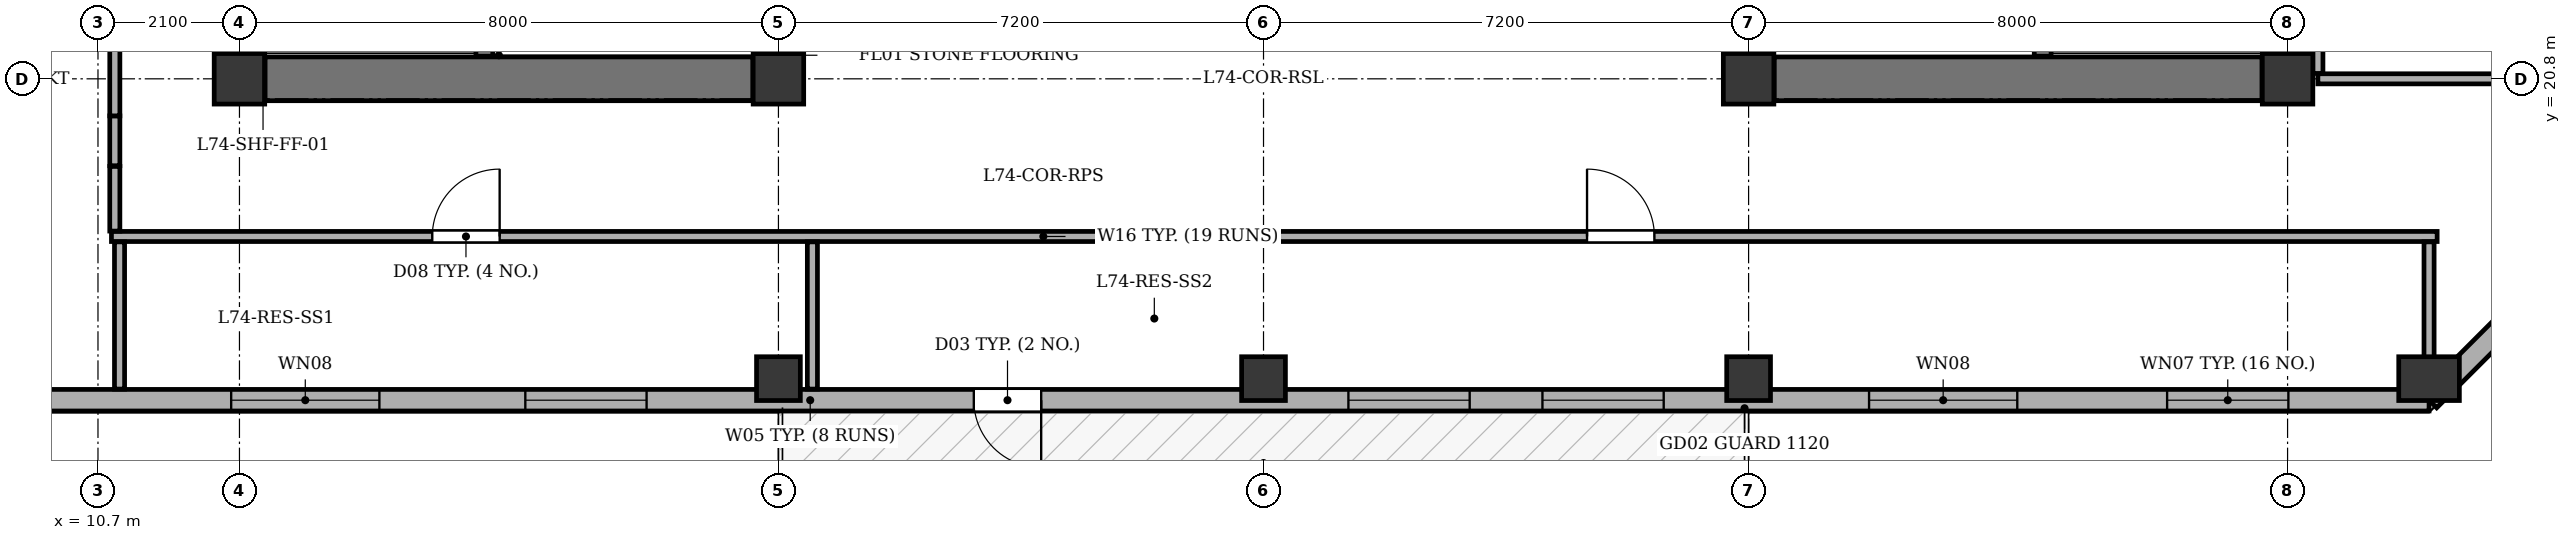
"""IFC4 building model, lengths in metres.
Left out: names, types, materials, properties, quantities, classifications, styles, units other than length and angle.
Written with IfcOpenShell. Run it as: python <this file> out.ifc"""

import sys

from ifc_helpers import new_model, si_unit, direction, frame, frame_2d, origin, origin_2d, place, context, subcontext, project, spatial, rectangle, extrude, element, fill, save


model = new_model("IFC4")
c1 = context("Model", 3, precision=1e-05, world=origin(), true_north=direction((0.0, 1.0)))
c2 = subcontext(c1, "Body", "Model", "MODEL_VIEW")
j1 = project(units=[si_unit("LENGTHUNIT", "METRE"), si_unit("PLANEANGLEUNIT", "RADIAN")], contexts=[c1])
p1 = place(None, origin())
s1 = spatial("IfcSite", under=j1, at=p1, CompositionType="ELEMENT")
p2 = place(p1, origin())
s2 = spatial("IfcBuilding", under=s1, at=p2, CompositionType="ELEMENT")
p3 = place(p2, frame((0.0, 0.0, 278.9)))
s3 = spatial("IfcBuildingStorey", under=s2, at=p3, CompositionType="ELEMENT", Elevation=278.9)
for number, where, z_axis, x_axis in (
    (1, (12.8, 20.8, 0.0), (0.0, 0.0, 1.0), (1.0, 0.0, 0.0)),
    (2, (20.8, 20.8, 0.0), (0.0, 0.0, 1.0), (1.0, 0.0, 0.0)),
    (3, (35.2, 20.8, 0.0), (0.0, 0.0, 1.0), (1.0, 0.0, 0.0)),
    (4, (43.2, 20.8, 0.0), (0.0, 0.0, 1.0), (1.0, 0.0, 0.0)),
):
    element("IfcColumn", number, at=place(p3, frame(where, z_axis=z_axis, x_axis=x_axis)), inside=s3, PredefinedType="COLUMN", context=c2, shape_type="SweptSolid", body=[
        extrude(rectangle(XDim=0.75, YDim=0.75, at=origin_2d()), origin(), (0.0, 0.0, 1.0), 3.4),
    ])
for number, where, z_axis, x_axis in (
    (5, (20.8, 16.35, 0.0), (0.0, 0.0, 1.0), (1.0, 0.0, 0.0)),
    (6, (28.0, 16.35, 0.0), (0.0, 0.0, 1.0), (1.0, 0.0, 0.0)),
    (7, (35.2, 16.35, 0.0), (0.0, 0.0, 1.0), (1.0, 0.0, 0.0)),
):
    element("IfcColumn", number, at=place(p3, frame(where, z_axis=z_axis, x_axis=x_axis)), inside=s3, PredefinedType="COLUMN", context=c2, shape_type="SweptSolid", body=[
        extrude(rectangle(XDim=0.65, YDim=0.65, at=origin_2d()), origin(), (0.0, 0.0, 1.0), 3.4),
    ])
p4 = place(p3, frame((45.3, 16.35, 0.0), z_axis=(0.0, 0.0, 1.0), x_axis=(1.0, 0.0, 0.0)))
e8 = element("IfcColumn", 8, at=p4, inside=s3, PredefinedType="COLUMN", context=c2, shape_type="SweptSolid", body=[
    extrude(rectangle(XDim=0.65, YDim=0.9, at=origin_2d()), origin(), (0.0, 0.0, 1.0), 3.4),
])
p5 = place(p3, frame((45.3, 16.03, 0.0), z_axis=(0.0, 0.0, 1.0), x_axis=(-1.0, 0.0, 0.0)))
e9 = element("IfcWall", 9, at=p5, inside=s3, PredefinedType="STANDARD", context=c2, shape_type="SweptSolid", body=[
    extrude(rectangle(XDim=37.0, YDim=0.32, at=frame_2d((18.5, 0.0))), origin(), (0.0, 0.0, 1.0), 2.575),
])
p6 = place(p5, frame((20.6, 0.0, 0.0)))
e10 = element("IfcOpeningElement", 10, at=p6, cuts=e9, PredefinedType="OPENING", context=c2, shape_type="SweptSolid", body=[
    extrude(rectangle(XDim=1.0, YDim=2.02, at=frame_2d((0.5, 1.01))), frame((0.0, 0.17, 0.0), z_axis=(0.0, -1.0, 0.0), x_axis=(1.0, 0.0, 0.0)), (0.0, 0.0, 1.0), 0.34),
])
p7 = place(p5, frame((2.088, 0.0, 0.75)))
e11 = element("IfcOpeningElement", 11, at=p7, cuts=e9, PredefinedType="OPENING", context=c2, shape_type="SweptSolid", body=[
    extrude(rectangle(XDim=1.8, YDim=1.7, at=frame_2d((0.9, 0.85))), frame((0.0, 0.17, 0.0), z_axis=(0.0, -1.0, 0.0), x_axis=(1.0, 0.0, 0.0)), (0.0, 0.0, 1.0), 0.34),
])
p8 = place(p5, frame((6.112, 0.0, 0.75)))
e12 = element("IfcOpeningElement", 12, at=p8, cuts=e9, PredefinedType="OPENING", context=c2, shape_type="SweptSolid", body=[
    extrude(rectangle(XDim=2.2, YDim=1.7, at=frame_2d((1.1, 0.85))), frame((0.0, 0.17, 0.0), z_axis=(0.0, -1.0, 0.0), x_axis=(1.0, 0.0, 0.0)), (0.0, 0.0, 1.0), 0.34),
])
p9 = place(p5, frame((11.36, 0.0, 0.75)))
e13 = element("IfcOpeningElement", 13, at=p9, cuts=e9, PredefinedType="OPENING", context=c2, shape_type="SweptSolid", body=[
    extrude(rectangle(XDim=1.8, YDim=1.7, at=frame_2d((0.9, 0.85))), frame((0.0, 0.17, 0.0), z_axis=(0.0, -1.0, 0.0), x_axis=(1.0, 0.0, 0.0)), (0.0, 0.0, 1.0), 0.34),
])
p10 = place(p5, frame((14.24, 0.0, 0.75)))
e14 = element("IfcOpeningElement", 14, at=p10, cuts=e9, PredefinedType="OPENING", context=c2, shape_type="SweptSolid", body=[
    extrude(rectangle(XDim=1.8, YDim=1.7, at=frame_2d((0.9, 0.85))), frame((0.0, 0.17, 0.0), z_axis=(0.0, -1.0, 0.0), x_axis=(1.0, 0.0, 0.0)), (0.0, 0.0, 1.0), 0.34),
])
p11 = place(p5, frame((26.457, 0.0, 0.75)))
e15 = element("IfcOpeningElement", 15, at=p11, cuts=e9, PredefinedType="OPENING", context=c2, shape_type="SweptSolid", body=[
    extrude(rectangle(XDim=1.8, YDim=1.7, at=frame_2d((0.9, 0.85))), frame((0.0, 0.17, 0.0), z_axis=(0.0, -1.0, 0.0), x_axis=(1.0, 0.0, 0.0)), (0.0, 0.0, 1.0), 0.34),
])
p12 = place(p5, frame((30.423, 0.0, 0.75)))
e16 = element("IfcOpeningElement", 16, at=p12, cuts=e9, PredefinedType="OPENING", context=c2, shape_type="SweptSolid", body=[
    extrude(rectangle(XDim=2.2, YDim=1.7, at=frame_2d((1.1, 0.85))), frame((0.0, 0.17, 0.0), z_axis=(0.0, -1.0, 0.0), x_axis=(1.0, 0.0, 0.0)), (0.0, 0.0, 1.0), 0.34),
])
p13 = place(p3, frame((49.12, 19.85, 0.0), z_axis=(0.0, 0.0, 1.0), x_axis=(-0.707106781187, -0.707106781187, 0.0)))
e17 = element("IfcWall", 17, at=p13, inside=s3, PredefinedType="STANDARD", context=c2, shape_type="SweptSolid", body=[
    extrude(rectangle(XDim=5.402, YDim=0.32, at=frame_2d((2.701, 0.0))), origin(), (0.0, 0.0, 1.0), 2.575),
])
p14 = place(p13, frame((2.001, 0.0, 0.75)))
e18 = element("IfcOpeningElement", 18, at=p14, cuts=e17, PredefinedType="OPENING", context=c2, shape_type="SweptSolid", body=[
    extrude(rectangle(XDim=1.4, YDim=1.65, at=frame_2d((0.7, 0.825))), frame((0.0, 0.17, 0.0), z_axis=(0.0, -1.0, 0.0), x_axis=(1.0, 0.0, 0.0)), (0.0, 0.0, 1.0), 0.34),
])
p15 = place(p3, frame((12.8, 21.18, 0.0), z_axis=(0.0, 0.0, 1.0), x_axis=(0.0, 1.0, 0.0)))
e19 = element("IfcWall", 19, at=p15, inside=s3, PredefinedType="SHEAR", context=c2, shape_type="SweptSolid", body=[
    extrude(rectangle(XDim=12.04, YDim=0.65, at=frame_2d((6.02, 0.0))), origin(), (0.0, 0.0, 1.0), 2.95),
])
p16 = place(p3, frame((13.18, 20.8, 0.0), z_axis=(0.0, 0.0, 1.0), x_axis=(1.0, 0.0, 0.0)))
e20 = element("IfcWall", 20, at=p16, inside=s3, PredefinedType="SHEAR", context=c2, shape_type="SweptSolid", body=[
    extrude(rectangle(XDim=7.24, YDim=0.65, at=frame_2d((3.62, 0.0))), origin(), (0.0, 0.0, 1.0), 2.95),
])
p17 = place(p3, frame((20.8, 21.18, 0.0), z_axis=(0.0, 0.0, 1.0), x_axis=(0.0, 1.0, 0.0)))
e21 = element("IfcWall", 21, at=p17, inside=s3, PredefinedType="SHEAR", context=c2, shape_type="SweptSolid", body=[
    extrude(rectangle(XDim=3.87, YDim=0.65, at=frame_2d((1.935, 0.0))), origin(), (0.0, 0.0, 1.0), 2.95),
])
p18 = place(p17, frame((1.42, 0.0, 0.0)))
e22 = element("IfcOpeningElement", 22, at=p18, cuts=e21, PredefinedType="OPENING", context=c2, shape_type="SweptSolid", body=[
    extrude(rectangle(XDim=1.2, YDim=2.15, at=frame_2d((0.6, 1.075))), frame((0.0, 0.335, 0.0), z_axis=(0.0, -1.0, 0.0), x_axis=(1.0, 0.0, 0.0)), (0.0, 0.0, 1.0), 0.67),
])
p19 = place(p3, frame((16.435, 21.135, 0.0), z_axis=(0.0, 0.0, 1.0), x_axis=(0.0, 1.0, 0.0)))
e23 = element("IfcWall", 23, at=p19, inside=s3, PredefinedType="SHEAR", context=c2, shape_type="SweptSolid", body=[
    extrude(rectangle(XDim=12.13, YDim=0.25, at=frame_2d((6.065, 0.0))), origin(), (0.0, 0.0, 1.0), 2.95),
])
p20 = place(p19, frame((0.515, 0.0, 0.0)))
e24 = element("IfcOpeningElement", 24, at=p20, cuts=e23, PredefinedType="OPENING", context=c2, shape_type="SweptSolid", body=[
    extrude(rectangle(XDim=1.2, YDim=2.15, at=frame_2d((0.6, 1.075))), frame((0.0, 0.135, 0.0), z_axis=(0.0, -1.0, 0.0), x_axis=(1.0, 0.0, 0.0)), (0.0, 0.0, 1.0), 0.27),
])
p21 = place(p19, frame((2.665, 0.0, 0.0)))
e25 = element("IfcOpeningElement", 25, at=p21, cuts=e23, PredefinedType="OPENING", context=c2, shape_type="SweptSolid", body=[
    extrude(rectangle(XDim=1.15, YDim=2.15, at=frame_2d((0.575, 1.075))), frame((0.0, 0.135, 0.0), z_axis=(0.0, -1.0, 0.0), x_axis=(1.0, 0.0, 0.0)), (0.0, 0.0, 1.0), 0.27),
])
p22 = place(p3, frame((43.2, 21.18, 0.0), z_axis=(0.0, 0.0, 1.0), x_axis=(0.0, 1.0, 0.0)))
e26 = element("IfcWall", 26, at=p22, inside=s3, PredefinedType="SHEAR", context=c2, shape_type="SweptSolid", body=[
    extrude(rectangle(XDim=12.04, YDim=0.65, at=frame_2d((6.02, 0.0))), origin(), (0.0, 0.0, 1.0), 2.95),
])
p23 = place(p3, frame((35.58, 20.8, 0.0), z_axis=(0.0, 0.0, 1.0), x_axis=(1.0, 0.0, 0.0)))
e27 = element("IfcWall", 27, at=p23, inside=s3, PredefinedType="SHEAR", context=c2, shape_type="SweptSolid", body=[
    extrude(rectangle(XDim=7.24, YDim=0.65, at=frame_2d((3.62, 0.0))), origin(), (0.0, 0.0, 1.0), 2.95),
])
p24 = place(p3, frame((35.2, 21.18, 0.0), z_axis=(0.0, 0.0, 1.0), x_axis=(0.0, 1.0, 0.0)))
e28 = element("IfcWall", 28, at=p24, inside=s3, PredefinedType="SHEAR", context=c2, shape_type="SweptSolid", body=[
    extrude(rectangle(XDim=3.87, YDim=0.65, at=frame_2d((1.935, 0.0))), origin(), (0.0, 0.0, 1.0), 2.95),
])
p25 = place(p24, frame((1.42, 0.0, 0.0)))
e29 = element("IfcOpeningElement", 29, at=p25, cuts=e28, PredefinedType="OPENING", context=c2, shape_type="SweptSolid", body=[
    extrude(rectangle(XDim=1.2, YDim=2.15, at=frame_2d((0.6, 1.075))), frame((0.0, 0.335, 0.0), z_axis=(0.0, -1.0, 0.0), x_axis=(1.0, 0.0, 0.0)), (0.0, 0.0, 1.0), 0.67),
])
p26 = place(p3, frame((39.565, 21.135, 0.0), z_axis=(0.0, 0.0, 1.0), x_axis=(0.0, 1.0, 0.0)))
e30 = element("IfcWall", 30, at=p26, inside=s3, PredefinedType="SHEAR", context=c2, shape_type="SweptSolid", body=[
    extrude(rectangle(XDim=12.13, YDim=0.25, at=frame_2d((6.065, 0.0))), origin(), (0.0, 0.0, 1.0), 2.95),
])
p27 = place(p26, frame((0.515, 0.0, 0.0)))
e31 = element("IfcOpeningElement", 31, at=p27, cuts=e30, PredefinedType="OPENING", context=c2, shape_type="SweptSolid", body=[
    extrude(rectangle(XDim=1.2, YDim=2.15, at=frame_2d((0.6, 1.075))), frame((0.0, 0.135, 0.0), z_axis=(0.0, -1.0, 0.0), x_axis=(1.0, 0.0, 0.0)), (0.0, 0.0, 1.0), 0.27),
])
p28 = place(p26, frame((2.665, 0.0, 0.0)))
e32 = element("IfcOpeningElement", 32, at=p28, cuts=e30, PredefinedType="OPENING", context=c2, shape_type="SweptSolid", body=[
    extrude(rectangle(XDim=1.15, YDim=2.15, at=frame_2d((0.575, 1.075))), frame((0.0, 0.135, 0.0), z_axis=(0.0, -1.0, 0.0), x_axis=(1.0, 0.0, 0.0)), (0.0, 0.0, 1.0), 0.27),
])
p29 = place(p3, frame((10.9, 18.46, 0.0), z_axis=(0.0, 0.0, 1.0), x_axis=(1.0, 0.0, 0.0)))
e33 = element("IfcWall", 33, at=p29, inside=s3, PredefinedType="PARTITIONING", context=c2, shape_type="SweptSolid", body=[
    extrude(rectangle(XDim=34.52, YDim=0.15, at=frame_2d((17.26, 0.0))), origin(), (0.0, 0.0, 1.0), 2.95),
])
p30 = place(p29, frame((4.762, 0.0, 0.0)))
e34 = element("IfcOpeningElement", 34, at=p30, cuts=e33, PredefinedType="OPENING", context=c2, shape_type="SweptSolid", body=[
    extrude(rectangle(XDim=1.0, YDim=2.1, at=frame_2d((0.5, 1.05))), frame((0.0, 0.085, 0.0), z_axis=(0.0, -1.0, 0.0), x_axis=(1.0, 0.0, 0.0)), (0.0, 0.0, 1.0), 0.17),
])
p31 = place(p29, frame((21.902, 0.0, 0.0)))
e35 = element("IfcOpeningElement", 35, at=p31, cuts=e33, PredefinedType="OPENING", context=c2, shape_type="SweptSolid", body=[
    extrude(rectangle(XDim=1.0, YDim=2.1, at=frame_2d((0.5, 1.05))), frame((0.0, 0.085, 0.0), z_axis=(0.0, -1.0, 0.0), x_axis=(1.0, 0.0, 0.0)), (0.0, 0.0, 1.0), 0.17),
])
for number, where, z_axis, x_axis in (
    (36, (11.02, 16.195, 0.0), (0.0, 0.0, 1.0), (0.0, 1.0, 0.0)),
    (37, (21.304, 16.195, 0.0), (0.0, 0.0, 1.0), (0.0, 1.0, 0.0)),
    (38, (45.3, 16.195, 0.0), (0.0, 0.0, 1.0), (0.0, 1.0, 0.0)),
):
    element("IfcWall", number, at=place(p3, frame(where, z_axis=z_axis, x_axis=x_axis)), inside=s3, PredefinedType="PARTITIONING", context=c2, shape_type="SweptSolid", body=[
        extrude(rectangle(XDim=2.185, YDim=0.15, at=frame_2d((1.092, 0.0))), origin(), (0.0, 0.0, 1.0), 2.95),
    ])
p32 = place(p3, frame((10.95, 19.5, 0.0), z_axis=(0.0, 0.0, 1.0), x_axis=(0.0, -1.0, 0.0)))
e39 = element("IfcWall", 39, at=p32, inside=s3, PredefinedType="PARTITIONING", context=c2, shape_type="SweptSolid", body=[
    extrude(rectangle(XDim=0.96, YDim=0.15, at=frame_2d((0.48, 0.0))), origin(), (0.0, 0.0, 1.0), 2.95),
])
p33 = place(p3, frame((10.95, 19.51, 0.0), z_axis=(0.0, 0.0, 1.0), x_axis=(0.0, 1.0, 0.0)))
e40 = element("IfcWall", 40, at=p33, inside=s3, PredefinedType="PARTITIONING", context=c2, shape_type="SweptSolid", body=[
    extrude(rectangle(XDim=0.74, YDim=0.15, at=frame_2d((0.37, 0.0))), origin(), (0.0, 0.0, 1.0), 2.95),
])
p34 = place(p3, frame((10.95, 20.25, 0.0), z_axis=(0.0, 0.0, 1.0), x_axis=(0.0, 1.0, 0.0)))
e41 = element("IfcWall", 41, at=p34, inside=s3, PredefinedType="PARTITIONING", context=c2, shape_type="SweptSolid", body=[
    extrude(rectangle(XDim=13.9, YDim=0.15, at=frame_2d((6.95, 0.0))), origin(), (0.0, 0.0, 1.0), 2.95),
])
p35 = place(p3, frame((43.65, 20.8, 0.0), z_axis=(0.0, 0.0, 1.0), x_axis=(1.0, 0.0, 0.0)))
e42 = element("IfcWall", 42, at=p35, inside=s3, PredefinedType="PARTITIONING", context=c2, shape_type="SweptSolid", body=[
    extrude(rectangle(XDim=5.305, YDim=0.15, at=frame_2d((2.653, 0.0))), origin(), (0.0, 0.0, 1.0), 2.385),
])
p36 = place(p3, frame((43.65, 20.88, 0.0), z_axis=(0.0, 0.0, 1.0), x_axis=(0.0, 1.0, 0.0)))
e43 = element("IfcWall", 43, at=p36, inside=s3, PredefinedType="PARTITIONING", context=c2, shape_type="SweptSolid", body=[
    extrude(rectangle(XDim=13.27, YDim=0.15, at=frame_2d((6.635, 0.0))), origin(), (0.0, 0.0, 1.0), 2.95),
])
p37 = place(p6, origin())
e44 = element("IfcDoor", 44, at=p37, inside=s3, OperationType="SINGLE_SWING_LEFT", PredefinedType="DOOR", context=c2, shape_type="SweptSolid", body=[
    extrude(rectangle(XDim=1.0, YDim=2.02, at=frame_2d((0.5, 1.01))), frame((0.0, 0.025, 0.0), z_axis=(0.0, -1.0, 0.0), x_axis=(1.0, 0.0, 0.0)), (0.0, 0.0, 1.0), 0.05),
])
fill(e10, e44)
p38 = place(p7, origin())
e45 = element("IfcWindow", 45, at=p38, inside=s3, PartitioningType="SINGLE_PANEL", PredefinedType="WINDOW", context=c2, shape_type="SweptSolid", body=[
    extrude(rectangle(XDim=1.8, YDim=1.7, at=frame_2d((0.9, 0.85))), frame((0.0, -0.01, 0.0), z_axis=(0.0, -1.0, 0.0), x_axis=(1.0, 0.0, 0.0)), (0.0, 0.0, 1.0), 0.06),
])
fill(e11, e45)
p39 = place(p8, origin())
e46 = element("IfcWindow", 46, at=p39, inside=s3, PartitioningType="SINGLE_PANEL", PredefinedType="WINDOW", context=c2, shape_type="SweptSolid", body=[
    extrude(rectangle(XDim=2.2, YDim=1.7, at=frame_2d((1.1, 0.85))), frame((0.0, -0.01, 0.0), z_axis=(0.0, -1.0, 0.0), x_axis=(1.0, 0.0, 0.0)), (0.0, 0.0, 1.0), 0.06),
])
fill(e12, e46)
p40 = place(p9, origin())
e47 = element("IfcWindow", 47, at=p40, inside=s3, PartitioningType="SINGLE_PANEL", PredefinedType="WINDOW", context=c2, shape_type="SweptSolid", body=[
    extrude(rectangle(XDim=1.8, YDim=1.7, at=frame_2d((0.9, 0.85))), frame((0.0, -0.01, 0.0), z_axis=(0.0, -1.0, 0.0), x_axis=(1.0, 0.0, 0.0)), (0.0, 0.0, 1.0), 0.06),
])
fill(e13, e47)
p41 = place(p10, origin())
e48 = element("IfcWindow", 48, at=p41, inside=s3, PartitioningType="SINGLE_PANEL", PredefinedType="WINDOW", context=c2, shape_type="SweptSolid", body=[
    extrude(rectangle(XDim=1.8, YDim=1.7, at=frame_2d((0.9, 0.85))), frame((0.0, -0.01, 0.0), z_axis=(0.0, -1.0, 0.0), x_axis=(1.0, 0.0, 0.0)), (0.0, 0.0, 1.0), 0.06),
])
fill(e14, e48)
p42 = place(p11, origin())
e49 = element("IfcWindow", 49, at=p42, inside=s3, PartitioningType="SINGLE_PANEL", PredefinedType="WINDOW", context=c2, shape_type="SweptSolid", body=[
    extrude(rectangle(XDim=1.8, YDim=1.7, at=frame_2d((0.9, 0.85))), frame((0.0, -0.01, 0.0), z_axis=(0.0, -1.0, 0.0), x_axis=(1.0, 0.0, 0.0)), (0.0, 0.0, 1.0), 0.06),
])
fill(e15, e49)
p43 = place(p12, origin())
e50 = element("IfcWindow", 50, at=p43, inside=s3, PartitioningType="SINGLE_PANEL", PredefinedType="WINDOW", context=c2, shape_type="SweptSolid", body=[
    extrude(rectangle(XDim=2.2, YDim=1.7, at=frame_2d((1.1, 0.85))), frame((0.0, -0.01, 0.0), z_axis=(0.0, -1.0, 0.0), x_axis=(1.0, 0.0, 0.0)), (0.0, 0.0, 1.0), 0.06),
])
fill(e16, e50)
p44 = place(p30, origin())
e51 = element("IfcDoor", 51, at=p44, inside=s3, OperationType="SINGLE_SWING_RIGHT", PredefinedType="DOOR", context=c2, shape_type="SweptSolid", body=[
    extrude(rectangle(XDim=1.0, YDim=2.1, at=frame_2d((0.5, 1.05))), frame((0.0, 0.025, 0.0), z_axis=(0.0, -1.0, 0.0), x_axis=(1.0, 0.0, 0.0)), (0.0, 0.0, 1.0), 0.05),
])
fill(e34, e51)
p45 = place(p31, origin())
e52 = element("IfcDoor", 52, at=p45, inside=s3, OperationType="SINGLE_SWING_LEFT", PredefinedType="DOOR", context=c2, shape_type="SweptSolid", body=[
    extrude(rectangle(XDim=1.0, YDim=2.1, at=frame_2d((0.5, 1.05))), frame((0.0, 0.025, 0.0), z_axis=(0.0, -1.0, 0.0), x_axis=(1.0, 0.0, 0.0)), (0.0, 0.0, 1.0), 0.05),
])
fill(e35, e52)
save(model, sys.argv[1])
